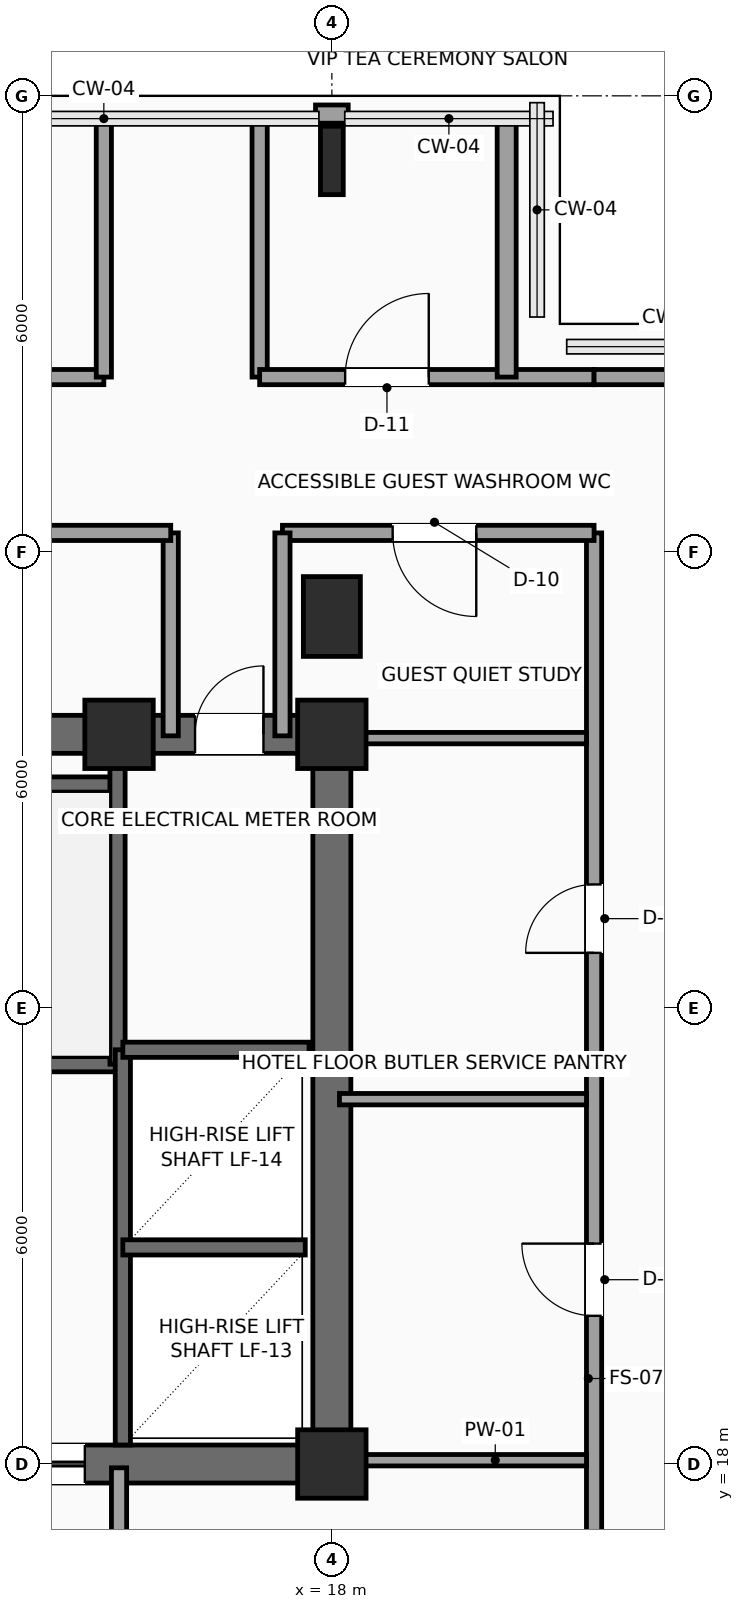
"""IFC4 building model, lengths in metres.
Left out: names, types, materials, properties, quantities, classifications, styles, units other than length and angle.
Written with IfcOpenShell. Run it as: python <this file> out.ifc"""

import sys

from ifc_helpers import new_model, si_unit, direction, frame, frame_2d, origin, origin_2d, place, context, subcontext, project, spatial, rectangle, i_section, extrude, element, fill, save


model = new_model("IFC4")
c1 = context("Model", 3, precision=1e-05, world=origin(), true_north=direction((0.0, 1.0)))
c2 = subcontext(c1, "Body", "Model", "MODEL_VIEW")
j1 = project(units=[si_unit("LENGTHUNIT", "METRE"), si_unit("PLANEANGLEUNIT", "RADIAN")], contexts=[c1])
p1 = place(None, origin())
s1 = spatial("IfcSite", under=j1, at=p1, CompositionType="ELEMENT")
p2 = place(p1, origin())
s2 = spatial("IfcBuilding", under=s1, at=p2, CompositionType="ELEMENT")
p3 = place(p2, frame((0.0, 0.0, 184.2)))
s3 = spatial("IfcBuildingStorey", under=s2, at=p3, CompositionType="ELEMENT", Elevation=184.2)
for number, where, z_axis, x_axis in (
    (1, (18.0, 18.0, 0.0), (0.0, 0.0, 1.0), (1.0, 0.0, 0.0)),
    (2, (15.2, 27.6, 0.0), (0.0, 0.0, 1.0), (1.0, 0.0, 0.0)),
    (3, (18.0, 27.6, 0.0), (0.0, 0.0, 1.0), (1.0, 0.0, 0.0)),
):
    element("IfcColumn", number, at=place(p3, frame(where, z_axis=z_axis, x_axis=x_axis)), inside=s3, PredefinedType="COLUMN", context=c2, shape_type="SweptSolid", body=[
        extrude(rectangle(XDim=0.9, YDim=0.9, at=origin_2d()), origin(), (0.0, 0.0, 1.0), 3.75),
    ])
p4 = place(p3, frame((18.0, 29.15, 0.0), z_axis=(0.0, 0.0, 1.0), x_axis=(1.0, 0.0, 0.0)))
e4 = element("IfcColumn", 4, at=p4, inside=s3, PredefinedType="COLUMN", context=c2, shape_type="SweptSolid", body=[
    extrude(rectangle(XDim=0.75, YDim=1.05, at=origin_2d()), origin(), (0.0, 0.0, 1.0), 3.75),
])
p5 = place(p3, frame((18.0, 35.15, 0.0), z_axis=(0.0, 0.0, 1.0), x_axis=(1.0, 0.0, 0.0)))
e5 = element("IfcColumn", 5, at=p5, inside=s3, PredefinedType="COLUMN", context=c2, shape_type="SweptSolid", body=[
    extrude(i_section(OverallWidth=0.3, OverallDepth=0.9, WebThickness=0.019, FlangeThickness=0.035, FilletRadius=0.03, at=origin_2d()), origin(), (0.0, 0.0, 1.0), 3.75),
])
p6 = place(p3, frame((17.785, 35.76, 0.0), z_axis=(0.0, 0.0, 1.0), x_axis=(1.0, 0.0, 0.0)))
e6 = element("IfcWall", 6, at=p6, inside=s3, PredefinedType="SOLIDWALL", context=c2, shape_type="SweptSolid", body=[
    extrude(rectangle(XDim=0.43, YDim=0.24, at=frame_2d((0.215, 0.0))), origin(), (0.0, 0.0, 1.0), 3.54),
])
p7 = place(p3, frame((6.0, 18.0, 0.0), z_axis=(0.0, 0.0, 1.0), x_axis=(1.0, 0.0, 0.0)))
e7 = element("IfcWall", 7, at=p7, inside=s3, PredefinedType="SHEAR", context=c2, shape_type="SweptSolid", body=[
    extrude(rectangle(XDim=12.0, YDim=0.5, at=frame_2d((6.0, 0.0))), origin(), (0.0, 0.0, 1.0), 3.54),
])
p8 = place(p7, frame((7.15, 0.0, 0.0)))
e8 = element("IfcOpeningElement", 8, at=p8, cuts=e7, PredefinedType="OPENING", context=c2, shape_type="SweptSolid", body=[
    extrude(rectangle(XDim=1.6, YDim=2.3, at=frame_2d((0.8, 1.15))), frame((0.0, 0.26, 0.0), z_axis=(0.0, -1.0, 0.0), x_axis=(1.0, 0.0, 0.0)), (0.0, 0.0, 1.0), 0.52),
])
p9 = place(p3, frame((6.0, 27.6, 0.0), z_axis=(0.0, 0.0, 1.0), x_axis=(1.0, 0.0, 0.0)))
e9 = element("IfcWall", 9, at=p9, inside=s3, PredefinedType="SHEAR", context=c2, shape_type="SweptSolid", body=[
    extrude(rectangle(XDim=12.0, YDim=0.5, at=frame_2d((6.0, 0.0))), origin(), (0.0, 0.0, 1.0), 3.54),
])
p10 = place(p9, frame((10.2, 0.0, 0.0)))
e10 = element("IfcOpeningElement", 10, at=p10, cuts=e9, PredefinedType="OPENING", context=c2, shape_type="SweptSolid", body=[
    extrude(rectangle(XDim=0.9, YDim=2.15, at=frame_2d((0.45, 1.075))), frame((0.0, 0.26, 0.0), z_axis=(0.0, -1.0, 0.0), x_axis=(1.0, 0.0, 0.0)), (0.0, 0.0, 1.0), 0.52),
])
p11 = place(p3, frame((18.0, 18.0, 0.0), z_axis=(0.0, 0.0, 1.0), x_axis=(0.0, 1.0, 0.0)))
e11 = element("IfcWall", 11, at=p11, inside=s3, PredefinedType="SHEAR", context=c2, shape_type="SweptSolid", body=[
    extrude(rectangle(XDim=9.6, YDim=0.5, at=frame_2d((4.8, 0.0))), origin(), (0.0, 0.0, 1.0), 3.54),
])
p12 = place(p3, frame((6.3, 23.26, 0.0), z_axis=(0.0, 0.0, 1.0), x_axis=(1.0, 0.0, 0.0)))
e12 = element("IfcWall", 12, at=p12, inside=s3, PredefinedType="SHEAR", context=c2, shape_type="SweptSolid", body=[
    extrude(rectangle(XDim=8.88, YDim=0.2, at=frame_2d((4.44, 0.0))), origin(), (0.0, 0.0, 1.0), 3.54),
])
p13 = place(p12, frame((0.35, 0.0, 0.0)))
e13 = element("IfcOpeningElement", 13, at=p13, cuts=e12, PredefinedType="OPENING", context=c2, shape_type="SweptSolid", body=[
    extrude(rectangle(XDim=1.1, YDim=2.2, at=frame_2d((0.55, 1.1))), frame((0.0, 0.11, 0.0), z_axis=(0.0, -1.0, 0.0), x_axis=(1.0, 0.0, 0.0)), (0.0, 0.0, 1.0), 0.22),
])
p14 = place(p3, frame((6.3, 26.94, 0.0), z_axis=(0.0, 0.0, 1.0), x_axis=(1.0, 0.0, 0.0)))
e14 = element("IfcWall", 14, at=p14, inside=s3, PredefinedType="SHEAR", context=c2, shape_type="SweptSolid", body=[
    extrude(rectangle(XDim=8.88, YDim=0.2, at=frame_2d((4.44, 0.0))), origin(), (0.0, 0.0, 1.0), 3.54),
])
p15 = place(p3, frame((15.18, 23.26, 0.0), z_axis=(0.0, 0.0, 1.0), x_axis=(0.0, 1.0, 0.0)))
e15 = element("IfcWall", 15, at=p15, inside=s3, PredefinedType="SHEAR", context=c2, shape_type="SweptSolid", body=[
    extrude(rectangle(XDim=4.04, YDim=0.2, at=frame_2d((2.02, 0.0))), origin(), (0.0, 0.0, 1.0), 3.54),
])
p16 = place(p3, frame((15.25, 18.25, 0.0), z_axis=(0.0, 0.0, 1.0), x_axis=(0.0, 1.0, 0.0)))
e16 = element("IfcWall", 16, at=p16, inside=s3, PredefinedType="SHEAR", context=c2, shape_type="SweptSolid", body=[
    extrude(rectangle(XDim=5.2, YDim=0.2, at=frame_2d((2.6, 0.0))), origin(), (0.0, 0.0, 1.0), 3.54),
])
p17 = place(p3, frame((15.25, 20.85, 0.0), z_axis=(0.0, 0.0, 1.0), x_axis=(1.0, 0.0, 0.0)))
e17 = element("IfcWall", 17, at=p17, inside=s3, PredefinedType="SHEAR", context=c2, shape_type="SweptSolid", body=[
    extrude(rectangle(XDim=2.4, YDim=0.2, at=frame_2d((1.2, 0.0))), origin(), (0.0, 0.0, 1.0), 3.54),
])
p18 = place(p3, frame((15.25, 23.45, 0.0), z_axis=(0.0, 0.0, 1.0), x_axis=(1.0, 0.0, 0.0)))
e18 = element("IfcWall", 18, at=p18, inside=s3, PredefinedType="SHEAR", context=c2, shape_type="SweptSolid", body=[
    extrude(rectangle(XDim=2.45, YDim=0.2, at=frame_2d((1.225, 0.0))), origin(), (0.0, 0.0, 1.0), 3.54),
])
p19 = place(p3, frame((15.2, 17.95, 0.0), z_axis=(0.0, 0.0, 1.0), x_axis=(0.0, -1.0, 0.0)))
e19 = element("IfcWall", 19, at=p19, inside=s3, PredefinedType="SOLIDWALL", context=c2, shape_type="SweptSolid", body=[
    extrude(rectangle(XDim=1.7, YDim=0.2, at=frame_2d((0.85, 0.0))), origin(), (0.0, 0.0, 1.0), 3.54),
])
p20 = place(p3, frame((21.45, 10.55, 0.0), z_axis=(0.0, 0.0, 1.0), x_axis=(0.0, 1.0, 0.0)))
e20 = element("IfcWall", 20, at=p20, inside=s3, PredefinedType="SOLIDWALL", context=c2, shape_type="SweptSolid", body=[
    extrude(rectangle(XDim=19.7, YDim=0.2, at=frame_2d((9.85, 0.0))), origin(), (0.0, 0.0, 1.0), 3.54),
])
p21 = place(p20, frame((9.4, 0.0, 0.0)))
e21 = element("IfcOpeningElement", 21, at=p21, cuts=e20, PredefinedType="OPENING", context=c2, shape_type="SweptSolid", body=[
    extrude(rectangle(XDim=0.95, YDim=2.15, at=frame_2d((0.475, 1.075))), frame((0.0, 0.11, 0.0), z_axis=(0.0, -1.0, 0.0), x_axis=(1.0, 0.0, 0.0)), (0.0, 0.0, 1.0), 0.22),
])
p22 = place(p20, frame((14.175, 0.0, 0.0)))
e22 = element("IfcOpeningElement", 22, at=p22, cuts=e20, PredefinedType="OPENING", context=c2, shape_type="SweptSolid", body=[
    extrude(rectangle(XDim=0.9, YDim=2.1, at=frame_2d((0.45, 1.05))), frame((0.0, 0.11, 0.0), z_axis=(0.0, -1.0, 0.0), x_axis=(1.0, 0.0, 0.0)), (0.0, 0.0, 1.0), 0.22),
])
p23 = place(p3, frame((21.45, 30.25, 0.0), z_axis=(0.0, 0.0, 1.0), x_axis=(-1.0, 0.0, 0.0)))
e23 = element("IfcWall", 23, at=p23, inside=s3, PredefinedType="SOLIDWALL", context=c2, shape_type="SweptSolid", body=[
    extrude(rectangle(XDim=4.1, YDim=0.2, at=frame_2d((2.05, 0.0))), origin(), (0.0, 0.0, 1.0), 3.54),
])
p24 = place(p23, frame((1.55, 0.0, 0.0)))
e24 = element("IfcOpeningElement", 24, at=p24, cuts=e23, PredefinedType="OPENING", context=c2, shape_type="SweptSolid", body=[
    extrude(rectangle(XDim=1.1, YDim=2.25, at=frame_2d((0.55, 1.125))), frame((0.0, 0.11, 0.0), z_axis=(0.0, -1.0, 0.0), x_axis=(1.0, 0.0, 0.0)), (0.0, 0.0, 1.0), 0.22),
])
for number, where, z_axis, x_axis in (
    (25, (17.35, 30.25, 0.0), (0.0, 0.0, 1.0), (0.0, -1.0, 0.0)),
    (26, (15.88, 27.58, 0.0), (0.0, 0.0, 1.0), (0.0, 1.0, 0.0)),
):
    element("IfcWall", number, at=place(p3, frame(where, z_axis=z_axis, x_axis=x_axis)), inside=s3, PredefinedType="SOLIDWALL", context=c2, shape_type="SweptSolid", body=[
        extrude(rectangle(XDim=2.67, YDim=0.2, at=frame_2d((1.335, 0.0))), origin(), (0.0, 0.0, 1.0), 3.54),
    ])
p25 = place(p3, frame((15.88, 30.25, 0.0), z_axis=(0.0, 0.0, 1.0), x_axis=(-1.0, 0.0, 0.0)))
e27 = element("IfcWall", 27, at=p25, inside=s3, PredefinedType="SOLIDWALL", context=c2, shape_type="SweptSolid", body=[
    extrude(rectangle(XDim=7.08, YDim=0.2, at=frame_2d((3.54, 0.0))), origin(), (0.0, 0.0, 1.0), 3.54),
])
p26 = place(p25, frame((2.11, 0.0, 0.0)))
e28 = element("IfcOpeningElement", 28, at=p26, cuts=e27, PredefinedType="OPENING", context=c2, shape_type="SweptSolid", body=[
    extrude(rectangle(XDim=1.1, YDim=2.25, at=frame_2d((0.55, 1.125))), frame((0.0, 0.11, 0.0), z_axis=(0.0, -1.0, 0.0), x_axis=(1.0, 0.0, 0.0)), (0.0, 0.0, 1.0), 0.22),
])
p27 = place(p3, frame((8.8, 32.3, 0.0), z_axis=(0.0, 0.0, 1.0), x_axis=(1.0, 0.0, 0.0)))
e29 = element("IfcWall", 29, at=p27, inside=s3, PredefinedType="SOLIDWALL", context=c2, shape_type="SweptSolid", body=[
    extrude(rectangle(XDim=6.2, YDim=0.2, at=frame_2d((3.1, 0.0))), origin(), (0.0, 0.0, 1.0), 3.132),
])
p28 = place(p27, frame((2.6, 0.0, 0.0)))
e30 = element("IfcOpeningElement", 30, at=p28, cuts=e29, PredefinedType="OPENING", context=c2, shape_type="SweptSolid", body=[
    extrude(rectangle(XDim=1.1, YDim=2.25, at=frame_2d((0.55, 1.125))), frame((0.0, 0.11, 0.0), z_axis=(0.0, -1.0, 0.0), x_axis=(1.0, 0.0, 0.0)), (0.0, 0.0, 1.0), 0.22),
])
for number, where, z_axis, x_axis in (
    (31, (15.0, 32.3, 0.0), (0.0, 0.0, 1.0), (0.0, 1.0, 0.0)),
    (32, (17.05, 35.7, 0.0), (0.0, 0.0, 1.0), (0.0, -1.0, 0.0)),
):
    element("IfcWall", number, at=place(p3, frame(where, z_axis=z_axis, x_axis=x_axis)), inside=s3, PredefinedType="SOLIDWALL", context=c2, shape_type="SweptSolid", body=[
        extrude(rectangle(XDim=3.4, YDim=0.2, at=frame_2d((1.7, 0.0))), origin(), (0.0, 0.0, 1.0), 3.54),
    ])
p29 = place(p3, frame((17.05, 32.3, 0.0), z_axis=(0.0, 0.0, 1.0), x_axis=(1.0, 0.0, 0.0)))
e33 = element("IfcWall", 33, at=p29, inside=s3, PredefinedType="SOLIDWALL", context=c2, shape_type="SweptSolid", body=[
    extrude(rectangle(XDim=4.4, YDim=0.2, at=frame_2d((2.2, 0.0))), origin(), (0.0, 0.0, 1.0), 3.132),
])
p30 = place(p29, frame((1.125, 0.0, 0.0)))
e34 = element("IfcOpeningElement", 34, at=p30, cuts=e33, PredefinedType="OPENING", context=c2, shape_type="SweptSolid", body=[
    extrude(rectangle(XDim=1.1, YDim=2.25, at=frame_2d((0.55, 1.125))), frame((0.0, 0.11, 0.0), z_axis=(0.0, -1.0, 0.0), x_axis=(1.0, 0.0, 0.0)), (0.0, 0.0, 1.0), 0.22),
])
p31 = place(p3, frame((21.45, 32.3, 0.0), z_axis=(0.0, 0.0, 1.0), x_axis=(1.0, 0.0, 0.0)))
e35 = element("IfcWall", 35, at=p31, inside=s3, PredefinedType="SOLIDWALL", context=c2, shape_type="SweptSolid", body=[
    extrude(rectangle(XDim=2.25, YDim=0.2, at=frame_2d((1.125, 0.0))), origin(), (0.0, 0.0, 1.0), 3.54),
])
p32 = place(p3, frame((18.1, 18.05, 0.0), z_axis=(0.0, 0.0, 1.0), x_axis=(1.0, 0.0, 0.0)))
e36 = element("IfcWall", 36, at=p32, inside=s3, PredefinedType="PARTITIONING", context=c2, shape_type="SweptSolid", body=[
    extrude(rectangle(XDim=3.25, YDim=0.15, at=frame_2d((1.625, 0.0))), origin(), (0.0, 0.0, 1.0), 3.132),
])
for number, where, z_axis, x_axis in (
    (37, (18.1, 22.8, 0.0), (0.0, 0.0, 1.0), (1.0, 0.0, 0.0)),
    (38, (18.1, 27.55, 0.0), (0.0, 0.0, 1.0), (1.0, 0.0, 0.0)),
):
    element("IfcWall", number, at=place(p3, frame(where, z_axis=z_axis, x_axis=x_axis)), inside=s3, PredefinedType="PARTITIONING", context=c2, shape_type="SweptSolid", body=[
        extrude(rectangle(XDim=3.25, YDim=0.15, at=frame_2d((1.625, 0.0))), origin(), (0.0, 0.0, 1.0), 3.54),
    ])
p33 = place(p3, frame((20.3, 32.3, 0.0), z_axis=(0.0, 0.0, 1.0), x_axis=(0.0, 1.0, 0.0)))
e39 = element("IfcWall", 39, at=p33, inside=s3, PredefinedType="PARTITIONING", context=c2, shape_type="SweptSolid", body=[
    extrude(rectangle(XDim=3.4, YDim=0.25, at=frame_2d((1.7, 0.0))), origin(), (0.0, 0.0, 1.0), 3.54),
])
p34 = place(p8, origin())
e40 = element("IfcDoor", 40, at=p34, inside=s3, OperationType="DOUBLE_DOOR_SLIDING", PredefinedType="DOOR", context=c2, shape_type="SweptSolid", body=[
    extrude(rectangle(XDim=1.6, YDim=2.3, at=frame_2d((0.8, 1.15))), frame((0.0, 0.025, 0.0), z_axis=(0.0, -1.0, 0.0), x_axis=(1.0, 0.0, 0.0)), (0.0, 0.0, 1.0), 0.05),
])
fill(e8, e40)
p35 = place(p10, origin())
e41 = element("IfcDoor", 41, at=p35, inside=s3, OperationType="SINGLE_SWING_RIGHT", PredefinedType="DOOR", context=c2, shape_type="SweptSolid", body=[
    extrude(rectangle(XDim=0.9, YDim=2.15, at=frame_2d((0.45, 1.075))), frame((0.0, 0.025, 0.0), z_axis=(0.0, -1.0, 0.0), x_axis=(1.0, 0.0, 0.0)), (0.0, 0.0, 1.0), 0.05),
])
fill(e10, e41)
p36 = place(p21, origin())
e42 = element("IfcDoor", 42, at=p36, inside=s3, OperationType="SINGLE_SWING_RIGHT", PredefinedType="DOOR", context=c2, shape_type="SweptSolid", body=[
    extrude(rectangle(XDim=0.95, YDim=2.15, at=frame_2d((0.475, 1.075))), frame((0.0, 0.025, 0.0), z_axis=(0.0, -1.0, 0.0), x_axis=(1.0, 0.0, 0.0)), (0.0, 0.0, 1.0), 0.05),
])
fill(e21, e42)
p37 = place(p22, origin())
e43 = element("IfcDoor", 43, at=p37, inside=s3, OperationType="SINGLE_SWING_LEFT", PredefinedType="DOOR", context=c2, shape_type="SweptSolid", body=[
    extrude(rectangle(XDim=0.9, YDim=2.1, at=frame_2d((0.45, 1.05))), frame((0.0, 0.025, 0.0), z_axis=(0.0, -1.0, 0.0), x_axis=(1.0, 0.0, 0.0)), (0.0, 0.0, 1.0), 0.05),
])
fill(e22, e43)
p38 = place(p24, origin())
e44 = element("IfcDoor", 44, at=p38, inside=s3, OperationType="SINGLE_SWING_LEFT", PredefinedType="DOOR", context=c2, shape_type="SweptSolid", body=[
    extrude(rectangle(XDim=1.1, YDim=2.25, at=frame_2d((0.55, 1.125))), frame((0.0, 0.025, 0.0), z_axis=(0.0, -1.0, 0.0), x_axis=(1.0, 0.0, 0.0)), (0.0, 0.0, 1.0), 0.05),
])
fill(e24, e44)
p39 = place(p30, origin())
e45 = element("IfcDoor", 45, at=p39, inside=s3, OperationType="SINGLE_SWING_RIGHT", PredefinedType="DOOR", context=c2, shape_type="SweptSolid", body=[
    extrude(rectangle(XDim=1.1, YDim=2.25, at=frame_2d((0.55, 1.125))), frame((0.0, 0.025, 0.0), z_axis=(0.0, -1.0, 0.0), x_axis=(1.0, 0.0, 0.0)), (0.0, 0.0, 1.0), 0.05),
])
fill(e34, e45)
save(model, sys.argv[1])
